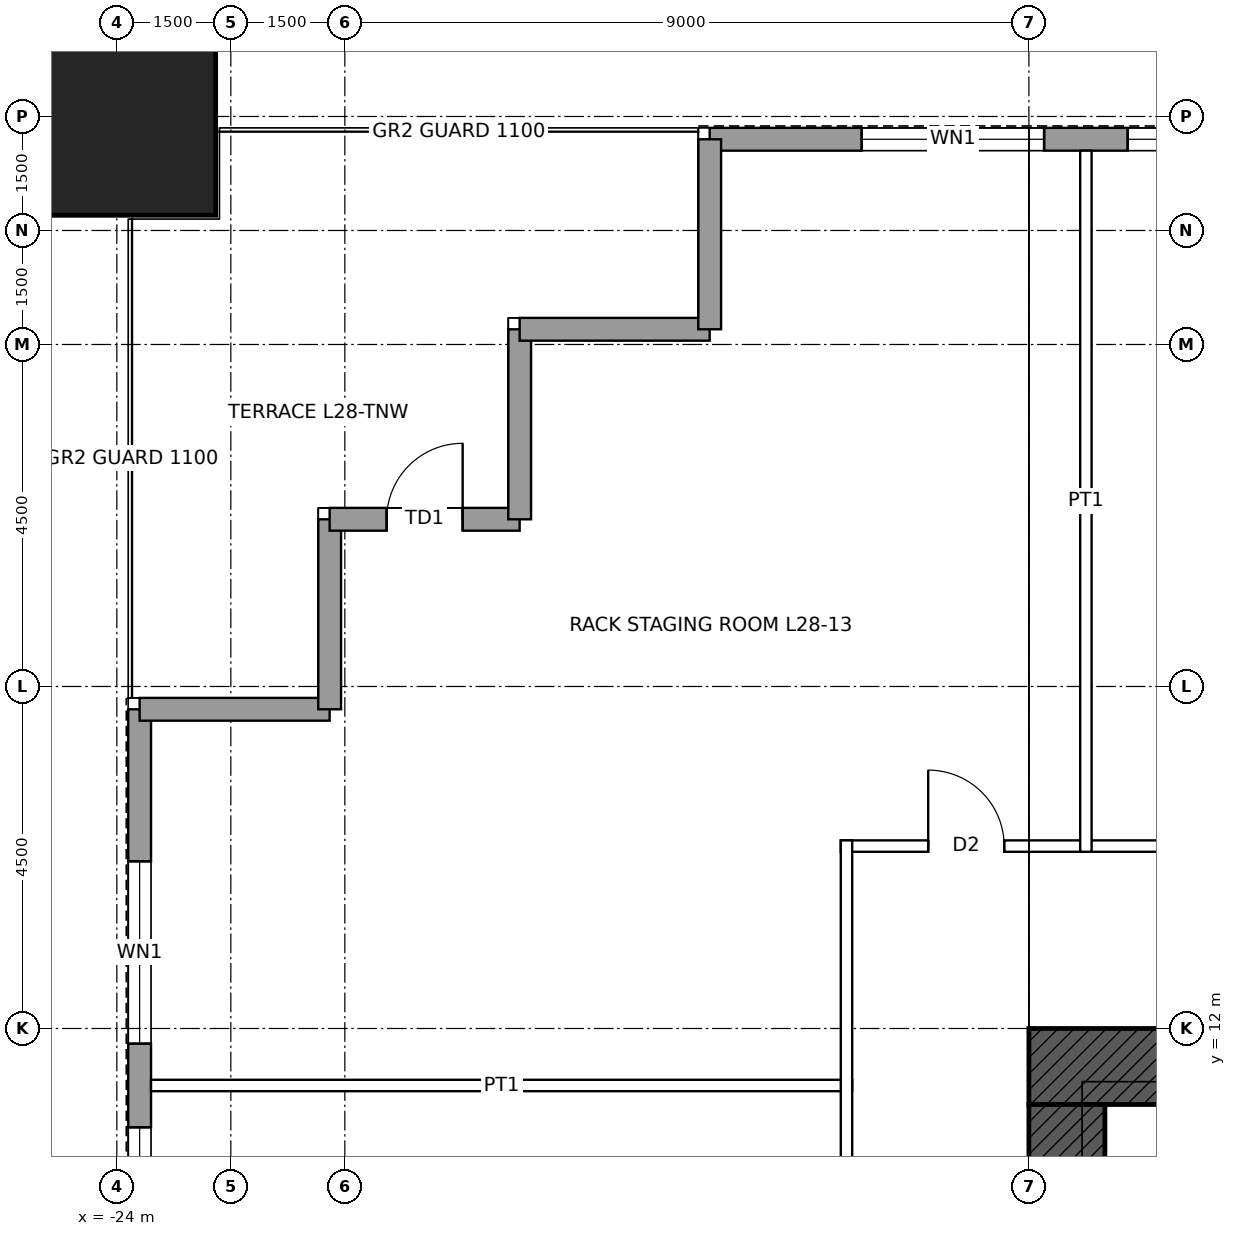
"""IFC4 building model, lengths in metres.
Left out: names, types, materials, properties, quantities, classifications, styles, units other than length and angle.
Written with IfcOpenShell. Run it as: python <this file> out.ifc"""

import sys

from ifc_helpers import new_model, si_unit, direction, frame, frame_2d, origin, origin_2d, place, context, subcontext, project, spatial, rectangle, hollow_rectangle, extrude, element, fill, save


model = new_model("IFC4")
c1 = context("Model", 3, precision=1e-05, world=origin(), true_north=direction((0.0, 1.0)))
c2 = subcontext(c1, "Body", "Model", "MODEL_VIEW")
j1 = project(units=[si_unit("LENGTHUNIT", "METRE"), si_unit("PLANEANGLEUNIT", "RADIAN")], contexts=[c1])
p1 = place(None, origin())
s1 = spatial("IfcSite", under=j1, at=p1, CompositionType="ELEMENT")
p2 = place(p1, origin())
s2 = spatial("IfcBuilding", under=s1, at=p2, CompositionType="ELEMENT")
p3 = place(p2, frame((0.0, 0.0, 140.4)))
s3 = spatial("IfcBuildingStorey", under=s2, at=p3, CompositionType="ELEMENT", Elevation=140.4)
p4 = place(p3, frame((-24.0, 24.0, 0.0), z_axis=(0.0, 0.0, 1.0), x_axis=(1.0, 0.0, 0.0)))
e1 = element("IfcColumn", 1, at=p4, inside=s3, PredefinedType="COLUMN", context=c2, shape_type="SweptSolid", body=[
    extrude(hollow_rectangle(XDim=2.6, YDim=2.6, WallThickness=0.13, at=origin_2d()), origin(), (0.0, 0.0, 1.0), 4.5),
])
p5 = place(p3, frame((-12.0, 11.5, 0.0), z_axis=(0.0, 0.0, 1.0), x_axis=(1.0, 0.0, 0.0)))
e2 = element("IfcWall", 2, at=p5, inside=s3, PredefinedType="SHEAR", context=c2, shape_type="SweptSolid", body=[
    extrude(rectangle(XDim=24.0, YDim=1.0, at=frame_2d((12.0, 0.0))), origin(), (0.0, 0.0, 1.0), 4.5),
])
p6 = place(p5, frame((6.25, 0.0, 0.0)))
e3 = element("IfcOpeningElement", 3, at=p6, cuts=e2, PredefinedType="OPENING", context=c2, shape_type="SweptSolid", body=[
    extrude(rectangle(XDim=1.0, YDim=2.4, at=frame_2d((0.5, 1.2))), frame((0.0, 0.51, 0.0), z_axis=(0.0, -1.0, 0.0), x_axis=(1.0, 0.0, 0.0)), (0.0, 0.0, 1.0), 1.02),
])
p7 = place(p5, frame((16.75, 0.0, 0.0)))
e4 = element("IfcOpeningElement", 4, at=p7, cuts=e2, PredefinedType="OPENING", context=c2, shape_type="SweptSolid", body=[
    extrude(rectangle(XDim=1.0, YDim=2.4, at=frame_2d((0.5, 1.2))), frame((0.0, 0.51, 0.0), z_axis=(0.0, -1.0, 0.0), x_axis=(1.0, 0.0, 0.0)), (0.0, 0.0, 1.0), 1.02),
])
p8 = place(p3, frame((-11.5, -11.0, 0.0), z_axis=(0.0, 0.0, 1.0), x_axis=(0.0, 1.0, 0.0)))
e5 = element("IfcWall", 5, at=p8, inside=s3, PredefinedType="SHEAR", context=c2, shape_type="SweptSolid", body=[
    extrude(rectangle(XDim=22.0, YDim=1.0, at=frame_2d((11.0, 0.0))), origin(), (0.0, 0.0, 1.0), 4.5),
])
p9 = place(p8, frame((10.5, 0.0, 0.0)))
e6 = element("IfcOpeningElement", 6, at=p9, cuts=e5, PredefinedType="OPENING", context=c2, shape_type="SweptSolid", body=[
    extrude(rectangle(XDim=1.0, YDim=2.4, at=frame_2d((0.5, 1.2))), frame((0.0, 0.51, 0.0), z_axis=(0.0, -1.0, 0.0), x_axis=(1.0, 0.0, 0.0)), (0.0, 0.0, 1.0), 1.02),
])
p10 = place(p3, frame((-16.2, 23.7, 0.0), z_axis=(0.0, 0.0, 1.0), x_axis=(1.0, 0.0, 0.0)))
e7 = element("IfcWall", 7, at=p10, inside=s3, PredefinedType="SOLIDWALL", context=c2, shape_type="SweptSolid", body=[
    extrude(rectangle(XDim=32.4, YDim=0.3, at=frame_2d((16.2, 0.0))), origin(), (0.0, 0.0, 1.0), 4.3),
])
p11 = place(p10, frame((2.0, 0.0, 1.0)))
e8 = element("IfcOpeningElement", 8, at=p11, cuts=e7, PredefinedType="OPENING", context=c2, shape_type="SweptSolid", body=[
    extrude(rectangle(XDim=2.4, YDim=1.2, at=frame_2d((1.2, 0.6))), frame((0.0, 0.16, 0.0), z_axis=(0.0, -1.0, 0.0), x_axis=(1.0, 0.0, 0.0)), (0.0, 0.0, 1.0), 0.32),
])
p12 = place(p10, frame((5.5, 0.0, 1.0)))
e9 = element("IfcOpeningElement", 9, at=p12, cuts=e7, PredefinedType="OPENING", context=c2, shape_type="SweptSolid", body=[
    extrude(rectangle(XDim=2.4, YDim=1.2, at=frame_2d((1.2, 0.6))), frame((0.0, 0.16, 0.0), z_axis=(0.0, -1.0, 0.0), x_axis=(1.0, 0.0, 0.0)), (0.0, 0.0, 1.0), 0.32),
])
p13 = place(p10, frame((9.5, 0.0, 1.0)))
e10 = element("IfcOpeningElement", 10, at=p13, cuts=e7, PredefinedType="OPENING", context=c2, shape_type="SweptSolid", body=[
    extrude(rectangle(XDim=2.4, YDim=1.2, at=frame_2d((1.2, 0.6))), frame((0.0, 0.16, 0.0), z_axis=(0.0, -1.0, 0.0), x_axis=(1.0, 0.0, 0.0)), (0.0, 0.0, 1.0), 0.32),
])
p14 = place(p10, frame((13.0, 0.0, 1.0)))
e11 = element("IfcOpeningElement", 11, at=p14, cuts=e7, PredefinedType="OPENING", context=c2, shape_type="SweptSolid", body=[
    extrude(rectangle(XDim=2.4, YDim=1.2, at=frame_2d((1.2, 0.6))), frame((0.0, 0.16, 0.0), z_axis=(0.0, -1.0, 0.0), x_axis=(1.0, 0.0, 0.0)), (0.0, 0.0, 1.0), 0.32),
])
p15 = place(p10, frame((17.0, 0.0, 1.0)))
e12 = element("IfcOpeningElement", 12, at=p15, cuts=e7, PredefinedType="OPENING", context=c2, shape_type="SweptSolid", body=[
    extrude(rectangle(XDim=2.4, YDim=1.2, at=frame_2d((1.2, 0.6))), frame((0.0, 0.16, 0.0), z_axis=(0.0, -1.0, 0.0), x_axis=(1.0, 0.0, 0.0)), (0.0, 0.0, 1.0), 0.32),
])
p16 = place(p10, frame((20.5, 0.0, 1.0)))
e13 = element("IfcOpeningElement", 13, at=p16, cuts=e7, PredefinedType="OPENING", context=c2, shape_type="SweptSolid", body=[
    extrude(rectangle(XDim=2.4, YDim=1.2, at=frame_2d((1.2, 0.6))), frame((0.0, 0.16, 0.0), z_axis=(0.0, -1.0, 0.0), x_axis=(1.0, 0.0, 0.0)), (0.0, 0.0, 1.0), 0.32),
])
p17 = place(p10, frame((24.5, 0.0, 1.0)))
e14 = element("IfcOpeningElement", 14, at=p17, cuts=e7, PredefinedType="OPENING", context=c2, shape_type="SweptSolid", body=[
    extrude(rectangle(XDim=2.4, YDim=1.2, at=frame_2d((1.2, 0.6))), frame((0.0, 0.16, 0.0), z_axis=(0.0, -1.0, 0.0), x_axis=(1.0, 0.0, 0.0)), (0.0, 0.0, 1.0), 0.32),
])
p18 = place(p10, frame((28.0, 0.0, 1.0)))
e15 = element("IfcOpeningElement", 15, at=p18, cuts=e7, PredefinedType="OPENING", context=c2, shape_type="SweptSolid", body=[
    extrude(rectangle(XDim=2.4, YDim=1.2, at=frame_2d((1.2, 0.6))), frame((0.0, 0.16, 0.0), z_axis=(0.0, -1.0, 0.0), x_axis=(1.0, 0.0, 0.0)), (0.0, 0.0, 1.0), 0.32),
])
p19 = place(p3, frame((-23.7, -16.2, 0.0), z_axis=(0.0, 0.0, 1.0), x_axis=(0.0, 1.0, 0.0)))
e16 = element("IfcWall", 16, at=p19, inside=s3, PredefinedType="SOLIDWALL", context=c2, shape_type="SweptSolid", body=[
    extrude(rectangle(XDim=32.4, YDim=0.3, at=frame_2d((16.2, 0.0))), origin(), (0.0, 0.0, 1.0), 4.3),
])
p20 = place(p19, frame((2.0, 0.0, 1.0)))
e17 = element("IfcOpeningElement", 17, at=p20, cuts=e16, PredefinedType="OPENING", context=c2, shape_type="SweptSolid", body=[
    extrude(rectangle(XDim=2.4, YDim=1.2, at=frame_2d((1.2, 0.6))), frame((0.0, 0.16, 0.0), z_axis=(0.0, -1.0, 0.0), x_axis=(1.0, 0.0, 0.0)), (0.0, 0.0, 1.0), 0.32),
])
p21 = place(p19, frame((5.5, 0.0, 1.0)))
e18 = element("IfcOpeningElement", 18, at=p21, cuts=e16, PredefinedType="OPENING", context=c2, shape_type="SweptSolid", body=[
    extrude(rectangle(XDim=2.4, YDim=1.2, at=frame_2d((1.2, 0.6))), frame((0.0, 0.16, 0.0), z_axis=(0.0, -1.0, 0.0), x_axis=(1.0, 0.0, 0.0)), (0.0, 0.0, 1.0), 0.32),
])
p22 = place(p19, frame((9.5, 0.0, 1.0)))
e19 = element("IfcOpeningElement", 19, at=p22, cuts=e16, PredefinedType="OPENING", context=c2, shape_type="SweptSolid", body=[
    extrude(rectangle(XDim=2.4, YDim=1.2, at=frame_2d((1.2, 0.6))), frame((0.0, 0.16, 0.0), z_axis=(0.0, -1.0, 0.0), x_axis=(1.0, 0.0, 0.0)), (0.0, 0.0, 1.0), 0.32),
])
p23 = place(p19, frame((13.0, 0.0, 1.0)))
e20 = element("IfcOpeningElement", 20, at=p23, cuts=e16, PredefinedType="OPENING", context=c2, shape_type="SweptSolid", body=[
    extrude(rectangle(XDim=2.4, YDim=1.2, at=frame_2d((1.2, 0.6))), frame((0.0, 0.16, 0.0), z_axis=(0.0, -1.0, 0.0), x_axis=(1.0, 0.0, 0.0)), (0.0, 0.0, 1.0), 0.32),
])
p24 = place(p19, frame((17.0, 0.0, 1.0)))
e21 = element("IfcOpeningElement", 21, at=p24, cuts=e16, PredefinedType="OPENING", context=c2, shape_type="SweptSolid", body=[
    extrude(rectangle(XDim=2.4, YDim=1.2, at=frame_2d((1.2, 0.6))), frame((0.0, 0.16, 0.0), z_axis=(0.0, -1.0, 0.0), x_axis=(1.0, 0.0, 0.0)), (0.0, 0.0, 1.0), 0.32),
])
p25 = place(p19, frame((20.5, 0.0, 1.0)))
e22 = element("IfcOpeningElement", 22, at=p25, cuts=e16, PredefinedType="OPENING", context=c2, shape_type="SweptSolid", body=[
    extrude(rectangle(XDim=2.4, YDim=1.2, at=frame_2d((1.2, 0.6))), frame((0.0, 0.16, 0.0), z_axis=(0.0, -1.0, 0.0), x_axis=(1.0, 0.0, 0.0)), (0.0, 0.0, 1.0), 0.32),
])
p26 = place(p19, frame((24.5, 0.0, 1.0)))
e23 = element("IfcOpeningElement", 23, at=p26, cuts=e16, PredefinedType="OPENING", context=c2, shape_type="SweptSolid", body=[
    extrude(rectangle(XDim=2.4, YDim=1.2, at=frame_2d((1.2, 0.6))), frame((0.0, 0.16, 0.0), z_axis=(0.0, -1.0, 0.0), x_axis=(1.0, 0.0, 0.0)), (0.0, 0.0, 1.0), 0.32),
])
p27 = place(p19, frame((28.0, 0.0, 1.0)))
e24 = element("IfcOpeningElement", 24, at=p27, cuts=e16, PredefinedType="OPENING", context=c2, shape_type="SweptSolid", body=[
    extrude(rectangle(XDim=2.4, YDim=1.2, at=frame_2d((1.2, 0.6))), frame((0.0, 0.16, 0.0), z_axis=(0.0, -1.0, 0.0), x_axis=(1.0, 0.0, 0.0)), (0.0, 0.0, 1.0), 0.32),
])
for number, where, z_axis, x_axis in (
    (25, (-23.7, 16.2, 0.0), (0.0, 0.0, 1.0), (1.0, 0.0, 0.0)),
    (26, (-21.2, 16.2, 0.0), (0.0, 0.0, 1.0), (0.0, 1.0, 0.0)),
):
    element("IfcWall", number, at=place(p3, frame(where, z_axis=z_axis, x_axis=x_axis)), inside=s3, PredefinedType="SOLIDWALL", context=c2, shape_type="SweptSolid", body=[
        extrude(rectangle(XDim=2.5, YDim=0.3, at=frame_2d((1.25, 0.0))), origin(), (0.0, 0.0, 1.0), 4.3),
    ])
p28 = place(p3, frame((-21.2, 18.7, 0.0), z_axis=(0.0, 0.0, 1.0), x_axis=(1.0, 0.0, 0.0)))
e27 = element("IfcWall", 27, at=p28, inside=s3, PredefinedType="SOLIDWALL", context=c2, shape_type="SweptSolid", body=[
    extrude(rectangle(XDim=2.5, YDim=0.3, at=frame_2d((1.25, 0.0))), origin(), (0.0, 0.0, 1.0), 4.3),
])
p29 = place(p28, frame((0.75, 0.0, 0.0)))
e28 = element("IfcOpeningElement", 28, at=p29, cuts=e27, PredefinedType="OPENING", context=c2, shape_type="SweptSolid", body=[
    extrude(rectangle(XDim=1.0, YDim=2.4, at=frame_2d((0.5, 1.2))), frame((0.0, 0.16, 0.0), z_axis=(0.0, -1.0, 0.0), x_axis=(1.0, 0.0, 0.0)), (0.0, 0.0, 1.0), 0.32),
])
for number, where, z_axis, x_axis in (
    (29, (-18.7, 18.7, 0.0), (0.0, 0.0, 1.0), (0.0, 1.0, 0.0)),
    (30, (-18.7, 21.2, 0.0), (0.0, 0.0, 1.0), (1.0, 0.0, 0.0)),
    (31, (-16.2, 21.2, 0.0), (0.0, 0.0, 1.0), (0.0, 1.0, 0.0)),
):
    element("IfcWall", number, at=place(p3, frame(where, z_axis=z_axis, x_axis=x_axis)), inside=s3, PredefinedType="SOLIDWALL", context=c2, shape_type="SweptSolid", body=[
        extrude(rectangle(XDim=2.5, YDim=0.3, at=frame_2d((1.25, 0.0))), origin(), (0.0, 0.0, 1.0), 4.3),
    ])
p30 = place(p3, frame((-23.55, 11.25, 0.0), z_axis=(0.0, 0.0, 1.0), x_axis=(1.0, 0.0, 0.0)))
e32 = element("IfcWall", 32, at=p30, inside=s3, PredefinedType="PARTITIONING", context=c2, shape_type="SweptSolid", body=[
    extrude(rectangle(XDim=9.225, YDim=0.15, at=frame_2d((4.613, 0.0))), origin(), (0.0, 0.0, 1.0), 3.431),
])
p31 = place(p3, frame((-14.475, 14.4, 0.0), z_axis=(0.0, 0.0, 1.0), x_axis=(1.0, 0.0, 0.0)))
e33 = element("IfcWall", 33, at=p31, inside=s3, PredefinedType="PARTITIONING", context=c2, shape_type="SweptSolid", body=[
    extrude(rectangle(XDim=28.95, YDim=0.15, at=frame_2d((14.475, 0.0))), origin(), (0.0, 0.0, 1.0), 4.3),
])
p32 = place(p31, frame((13.575, 0.0, 0.0)))
e34 = element("IfcOpeningElement", 34, at=p32, cuts=e33, PredefinedType="OPENING", context=c2, shape_type="SweptSolid", body=[
    extrude(rectangle(XDim=1.8, YDim=2.4, at=frame_2d((0.9, 1.2))), frame((0.0, 0.085, 0.0), z_axis=(0.0, -1.0, 0.0), x_axis=(1.0, 0.0, 0.0)), (0.0, 0.0, 1.0), 0.17),
])
p33 = place(p31, frame((26.8, 0.0, 0.0)))
e35 = element("IfcOpeningElement", 35, at=p33, cuts=e33, PredefinedType="OPENING", context=c2, shape_type="SweptSolid", body=[
    extrude(rectangle(XDim=1.0, YDim=2.1, at=frame_2d((0.5, 1.05))), frame((0.0, 0.085, 0.0), z_axis=(0.0, -1.0, 0.0), x_axis=(1.0, 0.0, 0.0)), (0.0, 0.0, 1.0), 0.17),
])
p34 = place(p31, frame((1.15, 0.0, 0.0)))
e36 = element("IfcOpeningElement", 36, at=p34, cuts=e33, PredefinedType="OPENING", context=c2, shape_type="SweptSolid", body=[
    extrude(rectangle(XDim=1.0, YDim=2.1, at=frame_2d((0.5, 1.05))), frame((0.0, 0.085, 0.0), z_axis=(0.0, -1.0, 0.0), x_axis=(1.0, 0.0, 0.0)), (0.0, 0.0, 1.0), 0.17),
])
p35 = place(p3, frame((-14.4, -14.475, 0.0), z_axis=(0.0, 0.0, 1.0), x_axis=(0.0, 1.0, 0.0)))
e37 = element("IfcWall", 37, at=p35, inside=s3, PredefinedType="PARTITIONING", context=c2, shape_type="SweptSolid", body=[
    extrude(rectangle(XDim=28.95, YDim=0.15, at=frame_2d((14.475, 0.0))), origin(), (0.0, 0.0, 1.0), 4.3),
])
p36 = place(p35, frame((4.2, 0.0, 0.0)))
e38 = element("IfcOpeningElement", 38, at=p36, cuts=e37, PredefinedType="OPENING", context=c2, shape_type="SweptSolid", body=[
    extrude(rectangle(XDim=1.8, YDim=2.4, at=frame_2d((0.9, 1.2))), frame((0.0, 0.085, 0.0), z_axis=(0.0, -1.0, 0.0), x_axis=(1.0, 0.0, 0.0)), (0.0, 0.0, 1.0), 0.17),
])
p37 = place(p35, frame((12.1, 0.0, 0.0)))
e39 = element("IfcOpeningElement", 39, at=p37, cuts=e37, PredefinedType="OPENING", context=c2, shape_type="SweptSolid", body=[
    extrude(rectangle(XDim=1.0, YDim=2.1, at=frame_2d((0.5, 1.05))), frame((0.0, 0.085, 0.0), z_axis=(0.0, -1.0, 0.0), x_axis=(1.0, 0.0, 0.0)), (0.0, 0.0, 1.0), 0.17),
])
p38 = place(p35, frame((21.075, 0.0, 0.0)))
e40 = element("IfcOpeningElement", 40, at=p38, cuts=e37, PredefinedType="OPENING", context=c2, shape_type="SweptSolid", body=[
    extrude(rectangle(XDim=1.8, YDim=2.4, at=frame_2d((0.9, 1.2))), frame((0.0, 0.085, 0.0), z_axis=(0.0, -1.0, 0.0), x_axis=(1.0, 0.0, 0.0)), (0.0, 0.0, 1.0), 0.17),
])
p39 = place(p3, frame((-11.25, 14.325, 0.0), z_axis=(0.0, 0.0, 1.0), x_axis=(0.0, 1.0, 0.0)))
e41 = element("IfcWall", 41, at=p39, inside=s3, PredefinedType="PARTITIONING", context=c2, shape_type="SweptSolid", body=[
    extrude(rectangle(XDim=9.225, YDim=0.15, at=frame_2d((4.613, 0.0))), origin(), (0.0, 0.0, 1.0), 3.431),
])
p40 = place(p11, origin())
e42 = element("IfcWindow", 42, at=p40, inside=s3, PartitioningType="SINGLE_PANEL", PredefinedType="WINDOW", context=c2, shape_type="SweptSolid", body=[
    extrude(rectangle(XDim=2.4, YDim=1.2, at=frame_2d((1.2, 0.6))), frame((0.0, 0.03, 0.0), z_axis=(0.0, -1.0, 0.0), x_axis=(1.0, 0.0, 0.0)), (0.0, 0.0, 1.0), 0.06),
])
fill(e8, e42)
p41 = place(p12, origin())
e43 = element("IfcWindow", 43, at=p41, inside=s3, PartitioningType="SINGLE_PANEL", PredefinedType="WINDOW", context=c2, shape_type="SweptSolid", body=[
    extrude(rectangle(XDim=2.4, YDim=1.2, at=frame_2d((1.2, 0.6))), frame((0.0, 0.03, 0.0), z_axis=(0.0, -1.0, 0.0), x_axis=(1.0, 0.0, 0.0)), (0.0, 0.0, 1.0), 0.06),
])
fill(e9, e43)
p42 = place(p26, origin())
e44 = element("IfcWindow", 44, at=p42, inside=s3, PartitioningType="SINGLE_PANEL", PredefinedType="WINDOW", context=c2, shape_type="SweptSolid", body=[
    extrude(rectangle(XDim=2.4, YDim=1.2, at=frame_2d((1.2, 0.6))), frame((0.0, 0.03, 0.0), z_axis=(0.0, -1.0, 0.0), x_axis=(1.0, 0.0, 0.0)), (0.0, 0.0, 1.0), 0.06),
])
fill(e23, e44)
p43 = place(p27, origin())
e45 = element("IfcWindow", 45, at=p43, inside=s3, PartitioningType="SINGLE_PANEL", PredefinedType="WINDOW", context=c2, shape_type="SweptSolid", body=[
    extrude(rectangle(XDim=2.4, YDim=1.2, at=frame_2d((1.2, 0.6))), frame((0.0, 0.03, 0.0), z_axis=(0.0, -1.0, 0.0), x_axis=(1.0, 0.0, 0.0)), (0.0, 0.0, 1.0), 0.06),
])
fill(e24, e45)
p44 = place(p29, origin())
e46 = element("IfcDoor", 46, at=p44, inside=s3, OperationType="SINGLE_SWING_RIGHT", PredefinedType="DOOR", context=c2, shape_type="SweptSolid", body=[
    extrude(rectangle(XDim=1.0, YDim=2.4, at=frame_2d((0.5, 1.2))), frame((0.0, 0.025, 0.0), z_axis=(0.0, -1.0, 0.0), x_axis=(1.0, 0.0, 0.0)), (0.0, 0.0, 1.0), 0.05),
])
fill(e28, e46)
p45 = place(p34, origin())
e47 = element("IfcDoor", 47, at=p45, inside=s3, OperationType="SINGLE_SWING_LEFT", PredefinedType="DOOR", context=c2, shape_type="SweptSolid", body=[
    extrude(rectangle(XDim=1.0, YDim=2.1, at=frame_2d((0.5, 1.05))), frame((0.0, 0.025, 0.0), z_axis=(0.0, -1.0, 0.0), x_axis=(1.0, 0.0, 0.0)), (0.0, 0.0, 1.0), 0.05),
])
fill(e36, e47)
save(model, sys.argv[1])
